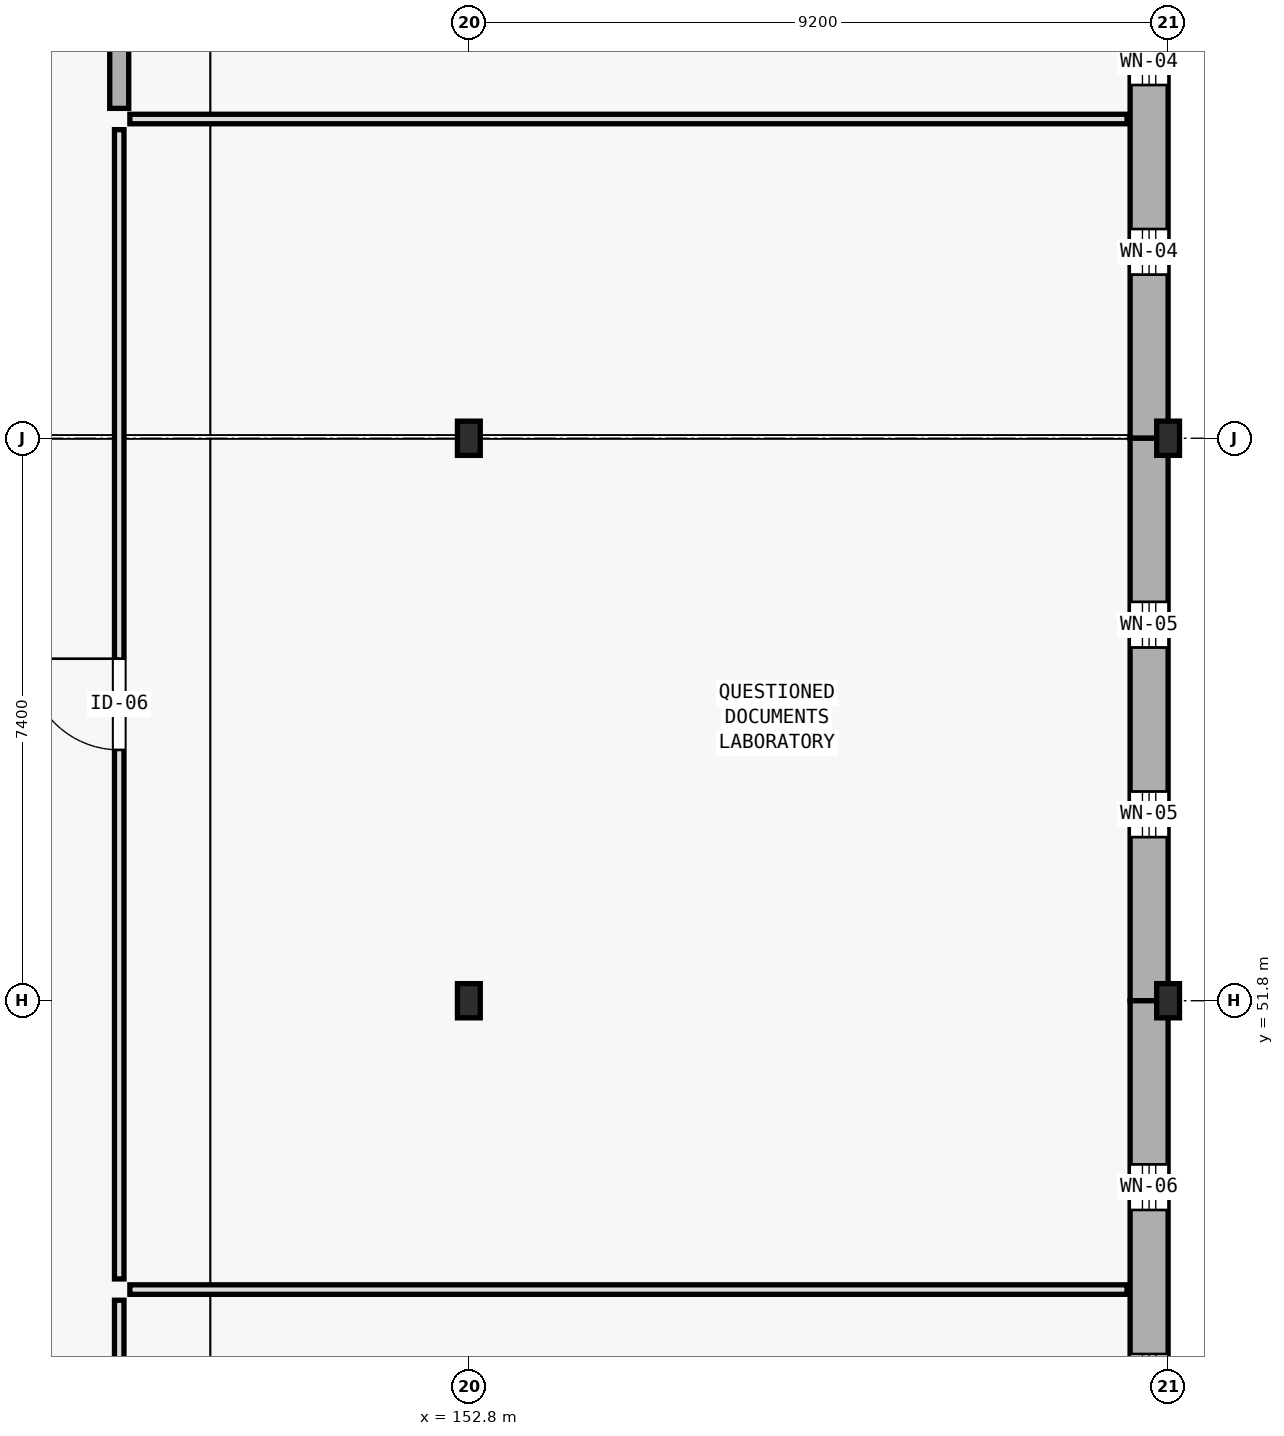
"""IFC4 building model, lengths in metres.
Left out: names, types, materials, properties, quantities, classifications, styles, units other than length and angle.
Written with IfcOpenShell. Run it as: python <this file> out.ifc"""

import sys

from ifc_helpers import new_model, si_unit, direction, frame, frame_2d, origin, origin_2d, place, context, subcontext, project, spatial, rectangle, i_section, extrude, element, fill, save


model = new_model("IFC4")
c1 = context("Model", 3, precision=1e-05, world=origin(), true_north=direction((0.0, 1.0)))
c2 = subcontext(c1, "Body", "Model", "MODEL_VIEW")
j1 = project(units=[si_unit("LENGTHUNIT", "METRE"), si_unit("PLANEANGLEUNIT", "RADIAN")], contexts=[c1])
p1 = place(None, origin())
s1 = spatial("IfcSite", under=j1, at=p1, CompositionType="ELEMENT")
p2 = place(p1, origin())
s2 = spatial("IfcBuilding", under=s1, at=p2, CompositionType="ELEMENT")
p3 = place(p2, frame((0.0, 0.0, 5.4)))
s3 = spatial("IfcBuildingStorey", under=s2, at=p3, CompositionType="ELEMENT", Elevation=5.4)
for number, where, z_axis, x_axis in (
    (1, (152.8, 51.8, 0.0), (0.0, 0.0, 1.0), (1.0, 0.0, 0.0)),
    (2, (152.8, 59.2, 0.0), (0.0, 0.0, 1.0), (1.0, 0.0, 0.0)),
    (3, (162.0, 51.8, 0.0), (0.0, 0.0, 1.0), (1.0, 0.0, 0.0)),
    (4, (162.0, 59.2, 0.0), (0.0, 0.0, 1.0), (1.0, 0.0, 0.0)),
):
    element("IfcColumn", number, at=place(p3, frame(where, z_axis=z_axis, x_axis=x_axis)), inside=s3, PredefinedType="COLUMN", context=c2, shape_type="SweptSolid", body=[
        extrude(i_section(OverallWidth=0.3, OverallDepth=0.45, WebThickness=0.014, FlangeThickness=0.026, FilletRadius=0.027, at=origin_2d()), origin(), (0.0, 0.0, 1.0), 4.5),
    ])
p4 = place(p3, frame((161.75, 66.6, 0.0), z_axis=(0.0, 0.0, 1.0), x_axis=(0.0, -1.0, 0.0)))
e5 = element("IfcWall", 5, at=p4, inside=s3, PredefinedType="STANDARD", context=c2, shape_type="SweptSolid", body=[
    extrude(rectangle(XDim=7.4, YDim=0.5, at=frame_2d((3.7, 0.0))), origin(), (0.0, 0.0, 1.0), 4.2),
])
p5 = place(p4, frame((2.153, 0.0, 0.9)))
e6 = element("IfcOpeningElement", 6, at=p5, cuts=e5, PredefinedType="OPENING", context=c2, shape_type="SweptSolid", body=[
    extrude(rectangle(XDim=0.6, YDim=1.85, at=frame_2d((0.3, 0.925))), frame((0.0, 0.26, 0.0), z_axis=(0.0, -1.0, 0.0), x_axis=(1.0, 0.0, 0.0)), (0.0, 0.0, 1.0), 0.52),
])
p6 = place(p4, frame((4.647, 0.0, 0.9)))
e7 = element("IfcOpeningElement", 7, at=p6, cuts=e5, PredefinedType="OPENING", context=c2, shape_type="SweptSolid", body=[
    extrude(rectangle(XDim=0.6, YDim=1.85, at=frame_2d((0.3, 0.925))), frame((0.0, 0.26, 0.0), z_axis=(0.0, -1.0, 0.0), x_axis=(1.0, 0.0, 0.0)), (0.0, 0.0, 1.0), 0.52),
])
p7 = place(p3, frame((161.75, 59.2, 0.0), z_axis=(0.0, 0.0, 1.0), x_axis=(0.0, -1.0, 0.0)))
e8 = element("IfcWall", 8, at=p7, inside=s3, PredefinedType="STANDARD", context=c2, shape_type="SweptSolid", body=[
    extrude(rectangle(XDim=7.4, YDim=0.5, at=frame_2d((3.7, 0.0))), origin(), (0.0, 0.0, 1.0), 4.2),
])
p8 = place(p7, frame((2.153, 0.0, 0.9)))
e9 = element("IfcOpeningElement", 9, at=p8, cuts=e8, PredefinedType="OPENING", context=c2, shape_type="SweptSolid", body=[
    extrude(rectangle(XDim=0.6, YDim=2.2, at=frame_2d((0.3, 1.1))), frame((0.0, 0.26, 0.0), z_axis=(0.0, -1.0, 0.0), x_axis=(1.0, 0.0, 0.0)), (0.0, 0.0, 1.0), 0.52),
])
p9 = place(p7, frame((4.647, 0.0, 0.9)))
e10 = element("IfcOpeningElement", 10, at=p9, cuts=e8, PredefinedType="OPENING", context=c2, shape_type="SweptSolid", body=[
    extrude(rectangle(XDim=0.6, YDim=2.2, at=frame_2d((0.3, 1.1))), frame((0.0, 0.26, 0.0), z_axis=(0.0, -1.0, 0.0), x_axis=(1.0, 0.0, 0.0)), (0.0, 0.0, 1.0), 0.52),
])
p10 = place(p3, frame((161.75, 51.8, 0.0), z_axis=(0.0, 0.0, 1.0), x_axis=(0.0, -1.0, 0.0)))
e11 = element("IfcWall", 11, at=p10, inside=s3, PredefinedType="STANDARD", context=c2, shape_type="SweptSolid", body=[
    extrude(rectangle(XDim=7.4, YDim=0.5, at=frame_2d((3.7, 0.0))), origin(), (0.0, 0.0, 1.0), 4.2),
])
p11 = place(p10, frame((2.153, 0.0, 0.9)))
e12 = element("IfcOpeningElement", 12, at=p11, cuts=e11, PredefinedType="OPENING", context=c2, shape_type="SweptSolid", body=[
    extrude(rectangle(XDim=0.6, YDim=2.6, at=frame_2d((0.3, 1.3))), frame((0.0, 0.26, 0.0), z_axis=(0.0, -1.0, 0.0), x_axis=(1.0, 0.0, 0.0)), (0.0, 0.0, 1.0), 0.52),
])
p12 = place(p10, frame((4.647, 0.0, 0.9)))
e13 = element("IfcOpeningElement", 13, at=p12, cuts=e11, PredefinedType="OPENING", context=c2, shape_type="SweptSolid", body=[
    extrude(rectangle(XDim=0.6, YDim=2.6, at=frame_2d((0.3, 1.3))), frame((0.0, 0.26, 0.0), z_axis=(0.0, -1.0, 0.0), x_axis=(1.0, 0.0, 0.0)), (0.0, 0.0, 1.0), 0.52),
])
p13 = place(p3, frame((148.34, 48.0, 0.0), z_axis=(0.0, 0.0, 1.0), x_axis=(1.0, 0.0, 0.0)))
e14 = element("IfcWall", 14, at=p13, inside=s3, PredefinedType="PARTITIONING", context=c2, shape_type="SweptSolid", body=[
    extrude(rectangle(XDim=13.12, YDim=0.125, at=frame_2d((6.56, 0.0))), origin(), (0.0, 0.0, 1.0), 3.69),
])
p14 = place(p3, frame((148.2, 21.94, 0.0), z_axis=(0.0, 0.0, 1.0), x_axis=(0.0, 1.0, 0.0)))
e15 = element("IfcWall", 15, at=p14, inside=s3, PredefinedType="PARTITIONING", context=c2, shape_type="SweptSolid", body=[
    extrude(rectangle(XDim=25.92, YDim=0.125, at=frame_2d((12.96, 0.0))), origin(), (0.0, 0.0, 1.0), 3.6),
])
p15 = place(p14, frame((12.36, 0.0, 0.0)))
e16 = element("IfcOpeningElement", 16, at=p15, cuts=e15, PredefinedType="OPENING", context=c2, shape_type="SweptSolid", body=[
    extrude(rectangle(XDim=1.2, YDim=2.2, at=frame_2d((0.6, 1.1))), frame((0.0, 0.073, 0.0), z_axis=(0.0, -1.0, 0.0), x_axis=(1.0, 0.0, 0.0)), (0.0, 0.0, 1.0), 0.145),
])
p16 = place(p3, frame((148.34, 63.4, 0.0), z_axis=(0.0, 0.0, 1.0), x_axis=(1.0, 0.0, 0.0)))
e17 = element("IfcWall", 17, at=p16, inside=s3, PredefinedType="PARTITIONING", context=c2, shape_type="SweptSolid", body=[
    extrude(rectangle(XDim=13.12, YDim=0.125, at=frame_2d((6.56, 0.0))), origin(), (0.0, 0.0, 1.0), 3.69),
])
p17 = place(p3, frame((148.2, 48.14, 0.0), z_axis=(0.0, 0.0, 1.0), x_axis=(0.0, 1.0, 0.0)))
e18 = element("IfcWall", 18, at=p17, inside=s3, PredefinedType="PARTITIONING", context=c2, shape_type="SweptSolid", body=[
    extrude(rectangle(XDim=15.12, YDim=0.125, at=frame_2d((7.56, 0.0))), origin(), (0.0, 0.0, 1.0), 3.63),
])
p18 = place(p17, frame((6.96, 0.0, 0.0)))
e19 = element("IfcOpeningElement", 19, at=p18, cuts=e18, PredefinedType="OPENING", context=c2, shape_type="SweptSolid", body=[
    extrude(rectangle(XDim=1.2, YDim=2.2, at=frame_2d((0.6, 1.1))), frame((0.0, 0.073, 0.0), z_axis=(0.0, -1.0, 0.0), x_axis=(1.0, 0.0, 0.0)), (0.0, 0.0, 1.0), 0.145),
])
p19 = place(p3, frame((148.2, 63.54, 0.0), z_axis=(0.0, 0.0, 1.0), x_axis=(0.0, 1.0, 0.0)))
e20 = element("IfcWall", 20, at=p19, inside=s3, PredefinedType="SOLIDWALL", context=c2, shape_type="SweptSolid", body=[
    extrude(rectangle(XDim=17.32, YDim=0.25, at=frame_2d((8.66, 0.0))), origin(), (0.0, 0.0, 1.0), 3.63),
])
p20 = place(p19, frame((7.935, 0.0, 0.0)))
e21 = element("IfcOpeningElement", 21, at=p20, cuts=e20, PredefinedType="OPENING", context=c2, shape_type="SweptSolid", body=[
    extrude(rectangle(XDim=1.45, YDim=2.3, at=frame_2d((0.725, 1.15))), frame((0.0, 0.135, 0.0), z_axis=(0.0, -1.0, 0.0), x_axis=(1.0, 0.0, 0.0)), (0.0, 0.0, 1.0), 0.27),
])
p21 = place(p5, origin())
e22 = element("IfcWindow", 22, at=p21, inside=s3, PartitioningType="SINGLE_PANEL", PredefinedType="WINDOW", context=c2, shape_type="SweptSolid", body=[
    extrude(rectangle(XDim=0.6, YDim=1.85, at=frame_2d((0.3, 0.925))), frame((0.0, 0.03, 0.0), z_axis=(0.0, -1.0, 0.0), x_axis=(1.0, 0.0, 0.0)), (0.0, 0.0, 1.0), 0.06),
])
fill(e6, e22)
p22 = place(p6, origin())
e23 = element("IfcWindow", 23, at=p22, inside=s3, PartitioningType="SINGLE_PANEL", PredefinedType="WINDOW", context=c2, shape_type="SweptSolid", body=[
    extrude(rectangle(XDim=0.6, YDim=1.85, at=frame_2d((0.3, 0.925))), frame((0.0, 0.03, 0.0), z_axis=(0.0, -1.0, 0.0), x_axis=(1.0, 0.0, 0.0)), (0.0, 0.0, 1.0), 0.06),
])
fill(e7, e23)
p23 = place(p8, origin())
e24 = element("IfcWindow", 24, at=p23, inside=s3, PartitioningType="SINGLE_PANEL", PredefinedType="WINDOW", context=c2, shape_type="SweptSolid", body=[
    extrude(rectangle(XDim=0.6, YDim=2.2, at=frame_2d((0.3, 1.1))), frame((0.0, 0.03, 0.0), z_axis=(0.0, -1.0, 0.0), x_axis=(1.0, 0.0, 0.0)), (0.0, 0.0, 1.0), 0.06),
])
fill(e9, e24)
p24 = place(p9, origin())
e25 = element("IfcWindow", 25, at=p24, inside=s3, PartitioningType="SINGLE_PANEL", PredefinedType="WINDOW", context=c2, shape_type="SweptSolid", body=[
    extrude(rectangle(XDim=0.6, YDim=2.2, at=frame_2d((0.3, 1.1))), frame((0.0, 0.03, 0.0), z_axis=(0.0, -1.0, 0.0), x_axis=(1.0, 0.0, 0.0)), (0.0, 0.0, 1.0), 0.06),
])
fill(e10, e25)
p25 = place(p11, origin())
e26 = element("IfcWindow", 26, at=p25, inside=s3, PartitioningType="SINGLE_PANEL", PredefinedType="WINDOW", context=c2, shape_type="SweptSolid", body=[
    extrude(rectangle(XDim=0.6, YDim=2.6, at=frame_2d((0.3, 1.3))), frame((0.0, 0.03, 0.0), z_axis=(0.0, -1.0, 0.0), x_axis=(1.0, 0.0, 0.0)), (0.0, 0.0, 1.0), 0.06),
])
fill(e12, e26)
p26 = place(p12, origin())
e27 = element("IfcWindow", 27, at=p26, inside=s3, PartitioningType="SINGLE_PANEL", PredefinedType="WINDOW", context=c2, shape_type="SweptSolid", body=[
    extrude(rectangle(XDim=0.6, YDim=2.6, at=frame_2d((0.3, 1.3))), frame((0.0, 0.03, 0.0), z_axis=(0.0, -1.0, 0.0), x_axis=(1.0, 0.0, 0.0)), (0.0, 0.0, 1.0), 0.06),
])
fill(e13, e27)
p27 = place(p18, origin())
e28 = element("IfcDoor", 28, at=p27, inside=s3, OperationType="SINGLE_SWING_RIGHT", PredefinedType="DOOR", context=c2, shape_type="SweptSolid", body=[
    extrude(rectangle(XDim=1.2, YDim=2.2, at=frame_2d((0.6, 1.1))), frame((0.0, 0.025, 0.0), z_axis=(0.0, -1.0, 0.0), x_axis=(1.0, 0.0, 0.0)), (0.0, 0.0, 1.0), 0.05),
])
fill(e19, e28)
save(model, sys.argv[1])
